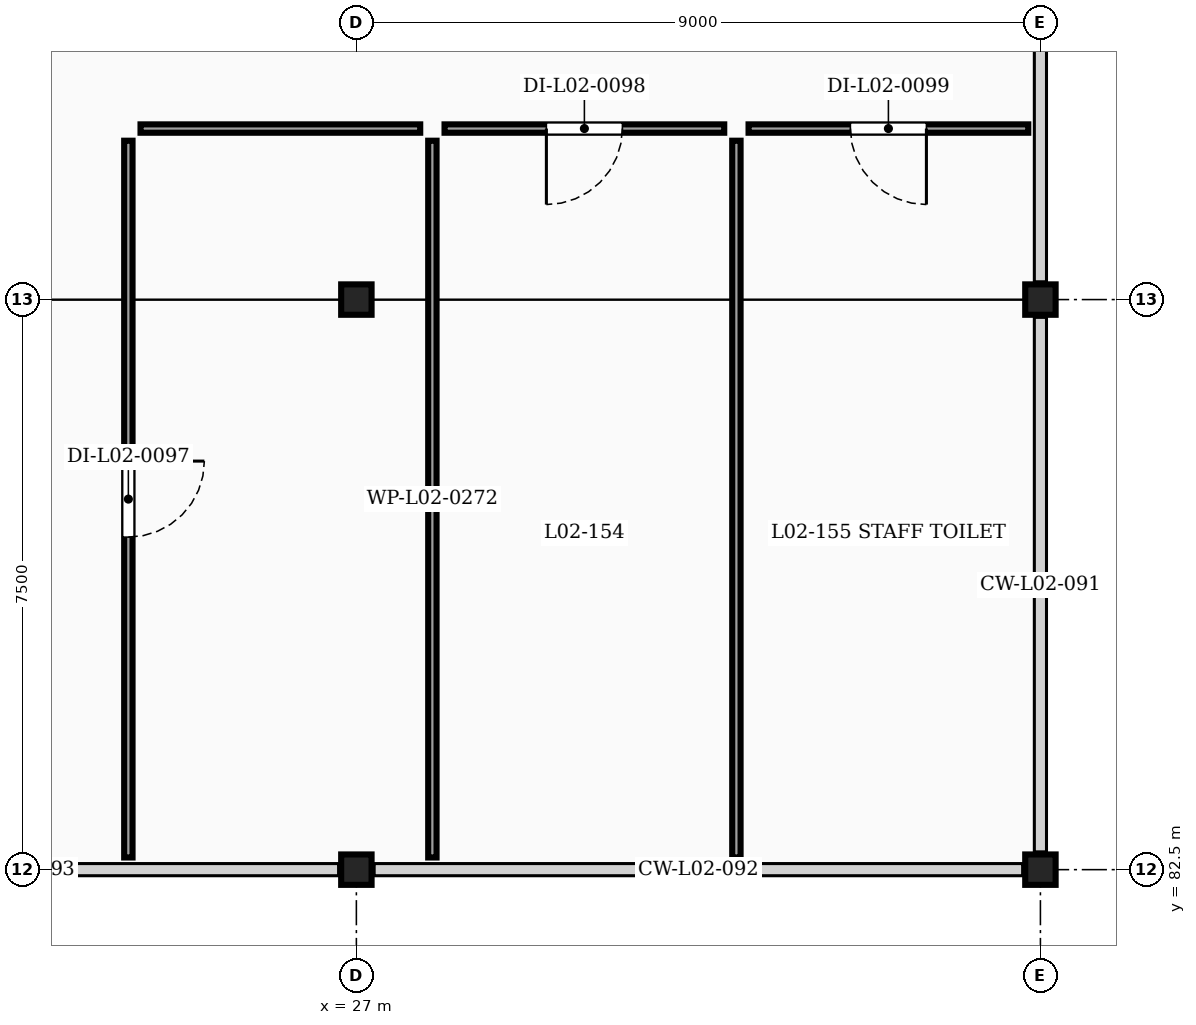
"""IFC4 building model, lengths in metres.
Left out: names, types, materials, properties, quantities, classifications, styles, units other than length and angle.
Written with IfcOpenShell. Run it as: python <this file> out.ifc"""

import sys

from ifc_helpers import new_model, si_unit, direction, frame, frame_2d, origin, origin_2d, place, context, subcontext, project, spatial, rectangle, extrude, element, fill, save


model = new_model("IFC4")
c1 = context("Model", 3, precision=1e-05, world=origin(), true_north=direction((0.0, 1.0)))
c2 = subcontext(c1, "Body", "Model", "MODEL_VIEW")
j1 = project(units=[si_unit("LENGTHUNIT", "METRE"), si_unit("PLANEANGLEUNIT", "RADIAN")], contexts=[c1])
p1 = place(None, origin())
s1 = spatial("IfcSite", under=j1, at=p1, CompositionType="ELEMENT")
p2 = place(p1, origin())
s2 = spatial("IfcBuilding", under=s1, at=p2, CompositionType="ELEMENT")
p3 = place(p2, frame((0.0, 0.0, 8.5)))
s3 = spatial("IfcBuildingStorey", under=s2, at=p3, CompositionType="ELEMENT", Elevation=8.5)
for number, where, z_axis, x_axis in (
    (1, (27.0, 82.5, 0.0), (0.0, 0.0, 1.0), (1.0, 0.0, 0.0)),
    (2, (36.0, 82.5, 0.0), (0.0, 0.0, 1.0), (1.0, 0.0, 0.0)),
    (3, (27.0, 90.0, 0.0), (0.0, 0.0, 1.0), (1.0, 0.0, 0.0)),
    (4, (36.0, 90.0, 0.0), (0.0, 0.0, 1.0), (1.0, 0.0, 0.0)),
):
    element("IfcColumn", number, at=place(p3, frame(where, z_axis=z_axis, x_axis=x_axis)), inside=s3, PredefinedType="COLUMN", context=c2, shape_type="SweptSolid", body=[
        extrude(rectangle(XDim=0.4, YDim=0.4, at=origin_2d()), origin(), (0.0, 0.0, 1.0), 3.8),
    ])
p4 = place(p3, frame((28.0, 82.66, 0.0), z_axis=(0.0, 0.0, 1.0), x_axis=(0.0, 1.0, 0.0)))
e5 = element("IfcWall", 5, at=p4, inside=s3, PredefinedType="PARTITIONING", context=c2, shape_type="SweptSolid", body=[
    extrude(rectangle(XDim=9.43, YDim=0.11, at=frame_2d((4.715, 0.0))), origin(), (0.0, 0.0, 1.0), 3.58),
])
p5 = place(p3, frame((24.0, 92.09, 0.0), z_axis=(0.0, 0.0, 1.0), x_axis=(0.0, -1.0, 0.0)))
e6 = element("IfcWall", 6, at=p5, inside=s3, PredefinedType="PARTITIONING", context=c2, shape_type="SweptSolid", body=[
    extrude(rectangle(XDim=9.43, YDim=0.11, at=frame_2d((4.715, 0.0))), origin(), (0.0, 0.0, 1.0), 3.172),
])
p6 = place(p5, frame((4.215, 0.0, 0.0)))
e7 = element("IfcOpeningElement", 7, at=p6, cuts=e6, PredefinedType="OPENING", context=c2, shape_type="SweptSolid", body=[
    extrude(rectangle(XDim=1.0, YDim=2.15, at=frame_2d((0.5, 1.075))), frame((0.0, 0.065, 0.0), z_axis=(0.0, -1.0, 0.0), x_axis=(1.0, 0.0, 0.0)), (0.0, 0.0, 1.0), 0.13),
])
p7 = place(p3, frame((27.84, 92.25, 0.0), z_axis=(0.0, 0.0, 1.0), x_axis=(-1.0, 0.0, 0.0)))
e8 = element("IfcWall", 8, at=p7, inside=s3, PredefinedType="PARTITIONING", context=c2, shape_type="SweptSolid", body=[
    extrude(rectangle(XDim=3.68, YDim=0.11, at=frame_2d((1.84, 0.0))), origin(), (0.0, 0.0, 1.0), 3.58),
])
p8 = place(p3, frame((32.0, 82.66, 0.0), z_axis=(0.0, 0.0, 1.0), x_axis=(0.0, 1.0, 0.0)))
e9 = element("IfcWall", 9, at=p8, inside=s3, PredefinedType="PARTITIONING", context=c2, shape_type="SweptSolid", body=[
    extrude(rectangle(XDim=9.43, YDim=0.11, at=frame_2d((4.715, 0.0))), origin(), (0.0, 0.0, 1.0), 3.58),
])
p9 = place(p3, frame((31.84, 92.25, 0.0), z_axis=(0.0, 0.0, 1.0), x_axis=(-1.0, 0.0, 0.0)))
e10 = element("IfcWall", 10, at=p9, inside=s3, PredefinedType="PARTITIONING", context=c2, shape_type="SweptSolid", body=[
    extrude(rectangle(XDim=3.68, YDim=0.11, at=frame_2d((1.84, 0.0))), origin(), (0.0, 0.0, 1.0), 3.58),
])
p10 = place(p9, frame((1.34, 0.0, 0.0)))
e11 = element("IfcOpeningElement", 11, at=p10, cuts=e10, PredefinedType="OPENING", context=c2, shape_type="SweptSolid", body=[
    extrude(rectangle(XDim=1.0, YDim=2.15, at=frame_2d((0.5, 1.075))), frame((0.0, 0.065, 0.0), z_axis=(0.0, -1.0, 0.0), x_axis=(1.0, 0.0, 0.0)), (0.0, 0.0, 1.0), 0.13),
])
p11 = place(p3, frame((35.84, 92.25, 0.0), z_axis=(0.0, 0.0, 1.0), x_axis=(-1.0, 0.0, 0.0)))
e12 = element("IfcWall", 12, at=p11, inside=s3, PredefinedType="PARTITIONING", context=c2, shape_type="SweptSolid", body=[
    extrude(rectangle(XDim=3.68, YDim=0.11, at=frame_2d((1.84, 0.0))), origin(), (0.0, 0.0, 1.0), 3.58),
])
p12 = place(p11, frame((1.34, 0.0, 0.0)))
e13 = element("IfcOpeningElement", 13, at=p12, cuts=e12, PredefinedType="OPENING", context=c2, shape_type="SweptSolid", body=[
    extrude(rectangle(XDim=1.0, YDim=2.15, at=frame_2d((0.5, 1.075))), frame((0.0, 0.065, 0.0), z_axis=(0.0, -1.0, 0.0), x_axis=(1.0, 0.0, 0.0)), (0.0, 0.0, 1.0), 0.13),
])
p13 = place(p6, origin())
e14 = element("IfcDoor", 14, at=p13, inside=s3, OperationType="SINGLE_SWING_LEFT", PredefinedType="DOOR", context=c2, shape_type="SweptSolid", body=[
    extrude(rectangle(XDim=1.0, YDim=2.15, at=frame_2d((0.5, 1.075))), frame((0.0, 0.025, 0.0), z_axis=(0.0, -1.0, 0.0), x_axis=(1.0, 0.0, 0.0)), (0.0, 0.0, 1.0), 0.05),
])
fill(e7, e14)
p14 = place(p10, origin())
e15 = element("IfcDoor", 15, at=p14, inside=s3, OperationType="SINGLE_SWING_RIGHT", PredefinedType="DOOR", context=c2, shape_type="SweptSolid", body=[
    extrude(rectangle(XDim=1.0, YDim=2.15, at=frame_2d((0.5, 1.075))), frame((0.0, 0.025, 0.0), z_axis=(0.0, -1.0, 0.0), x_axis=(1.0, 0.0, 0.0)), (0.0, 0.0, 1.0), 0.05),
])
fill(e11, e15)
p15 = place(p12, origin())
e16 = element("IfcDoor", 16, at=p15, inside=s3, OperationType="SINGLE_SWING_LEFT", PredefinedType="DOOR", context=c2, shape_type="SweptSolid", body=[
    extrude(rectangle(XDim=1.0, YDim=2.15, at=frame_2d((0.5, 1.075))), frame((0.0, 0.025, 0.0), z_axis=(0.0, -1.0, 0.0), x_axis=(1.0, 0.0, 0.0)), (0.0, 0.0, 1.0), 0.05),
])
fill(e13, e16)
save(model, sys.argv[1])
